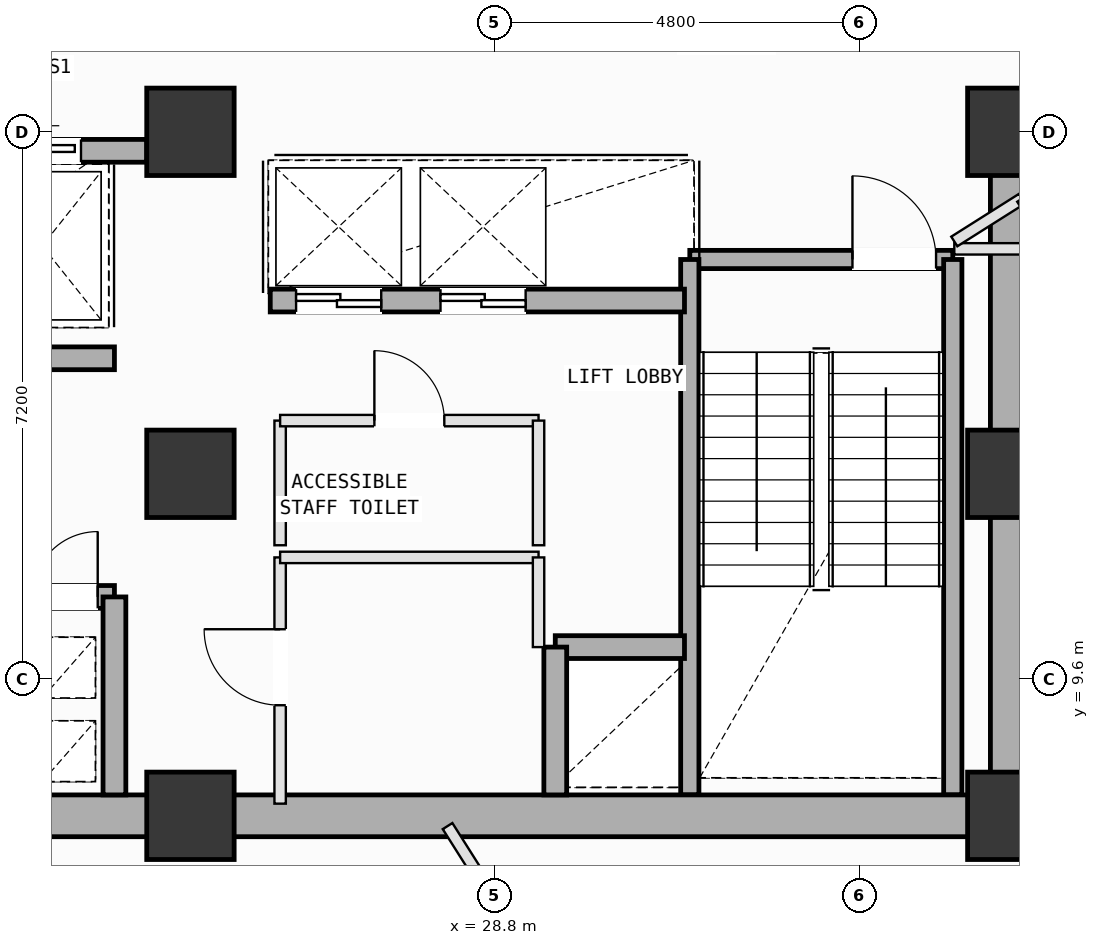
"""IFC4 building model, lengths in metres.
Left out: names, types, materials, properties, quantities, classifications, styles, units other than length and angle.
Written with IfcOpenShell. Run it as: python <this file> out.ifc"""

import sys

from ifc_helpers import new_model, si_unit, direction, frame, frame_2d, origin, origin_2d, place, context, subcontext, project, spatial, rectangle, extrude, element, fill, save


model = new_model("IFC4")
c1 = context("Model", 3, precision=1e-05, world=origin(), true_north=direction((0.0, 1.0)))
c2 = subcontext(c1, "Body", "Model", "MODEL_VIEW")
j1 = project(units=[si_unit("LENGTHUNIT", "METRE"), si_unit("PLANEANGLEUNIT", "RADIAN")], contexts=[c1])
p1 = place(None, origin())
s1 = spatial("IfcSite", under=j1, at=p1, CompositionType="ELEMENT")
p2 = place(p1, origin())
s2 = spatial("IfcBuilding", under=s1, at=p2, CompositionType="ELEMENT")
p3 = place(p2, frame((0.0, 0.0, 161.8)))
s3 = spatial("IfcBuildingStorey", under=s2, at=p3, CompositionType="ELEMENT", Elevation=161.8)
for number, where, z_axis, x_axis in (
    (1, (24.8, 7.8, 0.0), (0.0, 0.0, 1.0), (1.0, 0.0, 0.0)),
    (2, (24.8, 12.3, 0.0), (0.0, 0.0, 1.0), (1.0, 0.0, 0.0)),
    (3, (24.8, 16.8, 0.0), (0.0, 0.0, 1.0), (1.0, 0.0, 0.0)),
    (4, (35.6, 7.8, 0.0), (0.0, 0.0, 1.0), (1.0, 0.0, 0.0)),
    (5, (35.6, 12.3, 0.0), (0.0, 0.0, 1.0), (1.0, 0.0, 0.0)),
    (6, (35.6, 16.8, 0.0), (0.0, 0.0, 1.0), (1.0, 0.0, 0.0)),
):
    element("IfcColumn", number, at=place(p3, frame(where, z_axis=z_axis, x_axis=x_axis)), inside=s3, PredefinedType="COLUMN", context=c2, shape_type="SweptSolid", body=[
        extrude(rectangle(XDim=1.15, YDim=1.15, at=origin_2d()), origin(), (0.0, 0.0, 1.0), 4.0),
    ])
p4 = place(p3, frame((31.37, 15.12, 0.0), z_axis=(0.0, 0.0, 1.0), x_axis=(1.0, 0.0, 0.0)))
e7 = element("IfcWall", 7, at=p4, inside=s3, PredefinedType="SOLIDWALL", context=c2, shape_type="SweptSolid", body=[
    extrude(rectangle(XDim=3.46, YDim=0.24, at=frame_2d((1.73, 0.0))), origin(), (0.0, 0.0, 1.0), 3.78),
])
p5 = place(p4, frame((2.14, 0.0, 0.0)))
e8 = element("IfcOpeningElement", 8, at=p5, cuts=e7, PredefinedType="OPENING", context=c2, shape_type="SweptSolid", body=[
    extrude(rectangle(XDim=1.1, YDim=2.15, at=frame_2d((0.55, 1.075))), frame((0.0, 0.13, 0.0), z_axis=(0.0, -1.0, 0.0), x_axis=(1.0, 0.0, 0.0)), (0.0, 0.0, 1.0), 0.26),
])
for number, where, z_axis, x_axis in (
    (9, (34.83, 15.12, 0.0), (0.0, 0.0, 1.0), (0.0, -1.0, 0.0)),
    (10, (31.37, 8.075, 0.0), (0.0, 0.0, 1.0), (0.0, 1.0, 0.0)),
):
    element("IfcWall", number, at=place(p3, frame(where, z_axis=z_axis, x_axis=x_axis)), inside=s3, PredefinedType="SOLIDWALL", context=c2, shape_type="SweptSolid", body=[
        extrude(rectangle(XDim=7.045, YDim=0.24, at=frame_2d((3.522, 0.0))), origin(), (0.0, 0.0, 1.0), 3.78),
    ])
for number, where, z_axis, x_axis in (
    (11, (14.0, 7.8, 0.0), (0.0, 0.0, 1.0), (1.0, 0.0, 0.0)),
    (12, (24.8, 7.8, 0.0), (0.0, 0.0, 1.0), (1.0, 0.0, 0.0)),
):
    element("IfcWall", number, at=place(p3, frame(where, z_axis=z_axis, x_axis=x_axis)), inside=s3, PredefinedType="SHEAR", context=c2, shape_type="SweptSolid", body=[
        extrude(rectangle(XDim=10.8, YDim=0.55, at=frame_2d((5.4, 0.0))), origin(), (0.0, 0.0, 1.0), 3.78),
    ])
p6 = place(p3, frame((35.6, 7.8, 0.0), z_axis=(0.0, 0.0, 1.0), x_axis=(0.0, 1.0, 0.0)))
e13 = element("IfcWall", 13, at=p6, inside=s3, PredefinedType="SHEAR", context=c2, shape_type="SweptSolid", body=[
    extrude(rectangle(XDim=9.0, YDim=0.55, at=frame_2d((4.5, 0.0))), origin(), (0.0, 0.0, 1.0), 3.78),
])
p7 = place(p3, frame((19.85, 16.55, 0.0), z_axis=(0.0, 0.0, 1.0), x_axis=(1.0, 0.0, 0.0)))
e14 = element("IfcWall", 14, at=p7, inside=s3, PredefinedType="SOLIDWALL", context=c2, shape_type="SweptSolid", body=[
    extrude(rectangle(XDim=4.375, YDim=0.3, at=frame_2d((2.188, 0.0))), origin(), (0.0, 0.0, 1.0), 3.78),
])
p8 = place(p7, frame((0.475, 0.0, 0.0)))
e15 = element("IfcOpeningElement", 15, at=p8, cuts=e14, PredefinedType="OPENING", context=c2, shape_type="SweptSolid", body=[
    extrude(rectangle(XDim=1.25, YDim=2.18, at=frame_2d((0.625, 1.09))), frame((0.0, 0.16, 0.0), z_axis=(0.0, -1.0, 0.0), x_axis=(1.0, 0.0, 0.0)), (0.0, 0.0, 1.0), 0.32),
])
p9 = place(p7, frame((2.49, 0.0, 0.0)))
e16 = element("IfcOpeningElement", 16, at=p9, cuts=e14, PredefinedType="OPENING", context=c2, shape_type="SweptSolid", body=[
    extrude(rectangle(XDim=1.02, YDim=2.12, at=frame_2d((0.51, 1.06))), frame((0.0, 0.16, 0.0), z_axis=(0.0, -1.0, 0.0), x_axis=(1.0, 0.0, 0.0)), (0.0, 0.0, 1.0), 0.32),
])
p10 = place(p3, frame((18.5, 10.68, 0.0), z_axis=(0.0, 0.0, 1.0), x_axis=(1.0, 0.0, 0.0)))
e17 = element("IfcWall", 17, at=p10, inside=s3, PredefinedType="SOLIDWALL", context=c2, shape_type="SweptSolid", body=[
    extrude(rectangle(XDim=5.3, YDim=0.3, at=frame_2d((2.65, 0.0))), origin(), (0.0, 0.0, 1.0), 3.78),
])
p11 = place(p10, frame((4.22, 0.0, 0.0)))
e18 = element("IfcOpeningElement", 18, at=p11, cuts=e17, PredefinedType="OPENING", context=c2, shape_type="SweptSolid", body=[
    extrude(rectangle(XDim=0.86, YDim=2.06, at=frame_2d((0.43, 1.03))), frame((0.0, 0.16, 0.0), z_axis=(0.0, -1.0, 0.0), x_axis=(1.0, 0.0, 0.0)), (0.0, 0.0, 1.0), 0.32),
])
p12 = place(p10, frame((0.425, 0.0, 0.0)))
e19 = element("IfcOpeningElement", 19, at=p12, cuts=e17, PredefinedType="OPENING", context=c2, shape_type="SweptSolid", body=[
    extrude(rectangle(XDim=1.25, YDim=2.18, at=frame_2d((0.625, 1.09))), frame((0.0, 0.16, 0.0), z_axis=(0.0, -1.0, 0.0), x_axis=(1.0, 0.0, 0.0)), (0.0, 0.0, 1.0), 0.32),
])
p13 = place(p10, frame((2.525, 0.0, 0.0)))
e20 = element("IfcOpeningElement", 20, at=p13, cuts=e17, PredefinedType="OPENING", context=c2, shape_type="SweptSolid", body=[
    extrude(rectangle(XDim=1.25, YDim=2.18, at=frame_2d((0.625, 1.09))), frame((0.0, 0.16, 0.0), z_axis=(0.0, -1.0, 0.0), x_axis=(1.0, 0.0, 0.0)), (0.0, 0.0, 1.0), 0.32),
])
p14 = place(p3, frame((18.5, 13.82, 0.0), z_axis=(0.0, 0.0, 1.0), x_axis=(1.0, 0.0, 0.0)))
e21 = element("IfcWall", 21, at=p14, inside=s3, PredefinedType="SOLIDWALL", context=c2, shape_type="SweptSolid", body=[
    extrude(rectangle(XDim=5.3, YDim=0.3, at=frame_2d((2.65, 0.0))), origin(), (0.0, 0.0, 1.0), 3.78),
])
p15 = place(p14, frame((0.18, 0.0, 0.0)))
e22 = element("IfcOpeningElement", 22, at=p15, cuts=e21, PredefinedType="OPENING", context=c2, shape_type="SweptSolid", body=[
    extrude(rectangle(XDim=1.1, YDim=2.15, at=frame_2d((0.55, 1.075))), frame((0.0, 0.16, 0.0), z_axis=(0.0, -1.0, 0.0), x_axis=(1.0, 0.0, 0.0)), (0.0, 0.0, 1.0), 0.32),
])
p16 = place(p3, frame((23.8, 8.075, 0.0), z_axis=(0.0, 0.0, 1.0), x_axis=(0.0, 1.0, 0.0)))
e23 = element("IfcWall", 23, at=p16, inside=s3, PredefinedType="SOLIDWALL", context=c2, shape_type="SweptSolid", body=[
    extrude(rectangle(XDim=2.605, YDim=0.3, at=frame_2d((1.302, 0.0))), origin(), (0.0, 0.0, 1.0), 3.78),
])
p17 = place(p3, frame((29.6, 10.02, 0.0), z_axis=(0.0, 0.0, 1.0), x_axis=(1.0, 0.0, 0.0)))
e24 = element("IfcWall", 24, at=p17, inside=s3, PredefinedType="SOLIDWALL", context=c2, shape_type="SweptSolid", body=[
    extrude(rectangle(XDim=1.7, YDim=0.3, at=frame_2d((0.85, 0.0))), origin(), (0.0, 0.0, 1.0), 3.78),
])
p18 = place(p3, frame((29.6, 8.075, 0.0), z_axis=(0.0, 0.0, 1.0), x_axis=(0.0, 1.0, 0.0)))
e25 = element("IfcWall", 25, at=p18, inside=s3, PredefinedType="SOLIDWALL", context=c2, shape_type="SweptSolid", body=[
    extrude(rectangle(XDim=1.945, YDim=0.3, at=frame_2d((0.973, 0.0))), origin(), (0.0, 0.0, 1.0), 3.78),
])
p19 = place(p3, frame((25.85, 14.58, 0.0), z_axis=(0.0, 0.0, 1.0), x_axis=(1.0, 0.0, 0.0)))
e26 = element("IfcWall", 26, at=p19, inside=s3, PredefinedType="SOLIDWALL", context=c2, shape_type="SweptSolid", body=[
    extrude(rectangle(XDim=5.45, YDim=0.3, at=frame_2d((2.725, 0.0))), origin(), (0.0, 0.0, 1.0), 3.78),
])
p20 = place(p19, frame((0.34, 0.0, 0.0)))
e27 = element("IfcOpeningElement", 27, at=p20, cuts=e26, PredefinedType="OPENING", context=c2, shape_type="SweptSolid", body=[
    extrude(rectangle(XDim=1.12, YDim=2.15, at=frame_2d((0.56, 1.075))), frame((0.0, 0.16, 0.0), z_axis=(0.0, -1.0, 0.0), x_axis=(1.0, 0.0, 0.0)), (0.0, 0.0, 1.0), 0.32),
])
p21 = place(p19, frame((2.24, 0.0, 0.0)))
e28 = element("IfcOpeningElement", 28, at=p21, cuts=e26, PredefinedType="OPENING", context=c2, shape_type="SweptSolid", body=[
    extrude(rectangle(XDim=1.12, YDim=2.15, at=frame_2d((0.56, 1.075))), frame((0.0, 0.16, 0.0), z_axis=(0.0, -1.0, 0.0), x_axis=(1.0, 0.0, 0.0)), (0.0, 0.0, 1.0), 0.32),
])
p22 = place(p3, frame((25.98, 7.96, 0.0), z_axis=(0.0, 0.0, 1.0), x_axis=(0.0, 1.0, 0.0)))
e29 = element("IfcWall", 29, at=p22, inside=s3, PredefinedType="PARTITIONING", context=c2, shape_type="SweptSolid", body=[
    extrude(rectangle(XDim=3.24, YDim=0.15, at=frame_2d((1.62, 0.0))), origin(), (0.0, 0.0, 1.0), 3.78),
])
p23 = place(p22, frame((1.295, 0.0, 0.0)))
e30 = element("IfcOpeningElement", 30, at=p23, cuts=e29, PredefinedType="OPENING", context=c2, shape_type="SweptSolid", body=[
    extrude(rectangle(XDim=1.0, YDim=2.12, at=frame_2d((0.5, 1.06))), frame((0.0, 0.085, 0.0), z_axis=(0.0, -1.0, 0.0), x_axis=(1.0, 0.0, 0.0)), (0.0, 0.0, 1.0), 0.17),
])
p24 = place(p3, frame((25.98, 11.2, 0.0), z_axis=(0.0, 0.0, 1.0), x_axis=(1.0, 0.0, 0.0)))
e31 = element("IfcWall", 31, at=p24, inside=s3, PredefinedType="PARTITIONING", context=c2, shape_type="SweptSolid", body=[
    extrude(rectangle(XDim=3.4, YDim=0.15, at=frame_2d((1.7, 0.0))), origin(), (0.0, 0.0, 1.0), 3.78),
])
p25 = place(p3, frame((29.38, 11.2, 0.0), z_axis=(0.0, 0.0, 1.0), x_axis=(0.0, -1.0, 0.0)))
e32 = element("IfcWall", 32, at=p25, inside=s3, PredefinedType="PARTITIONING", context=c2, shape_type="SweptSolid", body=[
    extrude(rectangle(XDim=1.18, YDim=0.15, at=frame_2d((0.59, 0.0))), origin(), (0.0, 0.0, 1.0), 3.78),
])
p26 = place(p3, frame((25.98, 11.36, 0.0), z_axis=(0.0, 0.0, 1.0), x_axis=(0.0, 1.0, 0.0)))
e33 = element("IfcWall", 33, at=p26, inside=s3, PredefinedType="PARTITIONING", context=c2, shape_type="SweptSolid", body=[
    extrude(rectangle(XDim=1.64, YDim=0.15, at=frame_2d((0.82, 0.0))), origin(), (0.0, 0.0, 1.0), 3.78),
])
p27 = place(p3, frame((25.98, 13.0, 0.0), z_axis=(0.0, 0.0, 1.0), x_axis=(1.0, 0.0, 0.0)))
e34 = element("IfcWall", 34, at=p27, inside=s3, PredefinedType="PARTITIONING", context=c2, shape_type="SweptSolid", body=[
    extrude(rectangle(XDim=3.4, YDim=0.15, at=frame_2d((1.7, 0.0))), origin(), (0.0, 0.0, 1.0), 3.78),
])
p28 = place(p27, frame((1.24, 0.0, 0.0)))
e35 = element("IfcOpeningElement", 35, at=p28, cuts=e34, PredefinedType="OPENING", context=c2, shape_type="SweptSolid", body=[
    extrude(rectangle(XDim=0.92, YDim=2.1, at=frame_2d((0.46, 1.05))), frame((0.0, 0.085, 0.0), z_axis=(0.0, -1.0, 0.0), x_axis=(1.0, 0.0, 0.0)), (0.0, 0.0, 1.0), 0.17),
])
p29 = place(p3, frame((29.38, 13.0, 0.0), z_axis=(0.0, 0.0, 1.0), x_axis=(0.0, -1.0, 0.0)))
e36 = element("IfcWall", 36, at=p29, inside=s3, PredefinedType="PARTITIONING", context=c2, shape_type="SweptSolid", body=[
    extrude(rectangle(XDim=1.64, YDim=0.15, at=frame_2d((0.82, 0.0))), origin(), (0.0, 0.0, 1.0), 3.78),
])
p30 = place(p3, frame((28.183, 7.665, 0.0), z_axis=(0.0, 0.0, 1.0), x_axis=(0.534336995893, -0.845271539104, 0.0)))
e37 = element("IfcWall", 37, at=p30, inside=s3, PredefinedType="PARTITIONING", context=c2, shape_type="SweptSolid", body=[
    extrude(rectangle(XDim=10.546, YDim=0.15, at=frame_2d((5.273, 0.0))), origin(), (0.0, 0.0, 1.0), 3.78),
])
p31 = place(p30, frame((5.02, 0.0, 0.0)))
e38 = element("IfcOpeningElement", 38, at=p31, cuts=e37, PredefinedType="OPENING", context=c2, shape_type="SweptSolid", body=[
    extrude(rectangle(XDim=0.86, YDim=2.06, at=frame_2d((0.43, 1.03))), frame((0.0, 0.085, 0.0), z_axis=(0.0, -1.0, 0.0), x_axis=(1.0, 0.0, 0.0)), (0.0, 0.0, 1.0), 0.17),
])
p32 = place(p3, frame((36.15, 15.26, 0.0), z_axis=(0.0, 0.0, 1.0), x_axis=(-1.0, 0.0, 0.0)))
e39 = element("IfcWall", 39, at=p32, inside=s3, PredefinedType="PARTITIONING", context=c2, shape_type="SweptSolid", body=[
    extrude(rectangle(XDim=1.3, YDim=0.15, at=frame_2d((0.65, 0.0))), origin(), (0.0, 0.0, 1.0), 3.78),
])
p33 = place(p3, frame((34.85, 15.357, 0.0), z_axis=(0.0, 0.0, 1.0), x_axis=(0.84534574495, 0.534219591081, 0.0)))
e40 = element("IfcWall", 40, at=p33, inside=s3, PredefinedType="PARTITIONING", context=c2, shape_type="SweptSolid", body=[
    extrude(rectangle(XDim=1.054, YDim=0.15, at=frame_2d((0.527, 0.0))), origin(), (0.0, 0.0, 1.0), 3.78),
])
p34 = place(p3, frame((35.741, 15.92, 0.0), z_axis=(0.0, 0.0, 1.0), x_axis=(0.534355579838, -0.845259791008, 0.0)))
e41 = element("IfcWall", 41, at=p34, inside=s3, PredefinedType="PARTITIONING", context=c2, shape_type="SweptSolid", body=[
    extrude(rectangle(XDim=13.83, YDim=0.15, at=frame_2d((6.915, 0.0))), origin(), (0.0, 0.0, 1.0), 3.78),
])
p35 = place(p34, frame((6.485, 0.0, 0.0)))
e42 = element("IfcOpeningElement", 42, at=p35, cuts=e41, PredefinedType="OPENING", context=c2, shape_type="SweptSolid", body=[
    extrude(rectangle(XDim=0.86, YDim=2.06, at=frame_2d((0.43, 1.03))), frame((0.0, 0.085, 0.0), z_axis=(0.0, -1.0, 0.0), x_axis=(1.0, 0.0, 0.0)), (0.0, 0.0, 1.0), 0.17),
])
p36 = place(p3, frame((35.6, 7.5, 0.0), z_axis=(0.0, 0.0, 1.0), x_axis=(1.0, 0.0, 0.0)))
e43 = element("IfcWall", 43, at=p36, inside=s3, PredefinedType="PARTITIONING", context=c2, shape_type="SweptSolid", body=[
    extrude(rectangle(XDim=0.55, YDim=0.15, at=frame_2d((0.275, 0.0))), origin(), (0.0, 0.0, 1.0), 3.065),
])
p37 = place(p5, origin())
e44 = element("IfcDoor", 44, at=p37, inside=s3, OperationType="SINGLE_SWING_LEFT", PredefinedType="DOOR", context=c2, shape_type="SweptSolid", body=[
    extrude(rectangle(XDim=1.1, YDim=2.15, at=frame_2d((0.55, 1.075))), frame((0.0, 0.025, 0.0), z_axis=(0.0, -1.0, 0.0), x_axis=(1.0, 0.0, 0.0)), (0.0, 0.0, 1.0), 0.05),
])
fill(e8, e44)
p38 = place(p11, origin())
e45 = element("IfcDoor", 45, at=p38, inside=s3, OperationType="SINGLE_SWING_RIGHT", PredefinedType="DOOR", context=c2, shape_type="SweptSolid", body=[
    extrude(rectangle(XDim=0.86, YDim=2.06, at=frame_2d((0.43, 1.03))), frame((0.0, 0.025, 0.0), z_axis=(0.0, -1.0, 0.0), x_axis=(1.0, 0.0, 0.0)), (0.0, 0.0, 1.0), 0.05),
])
fill(e18, e45)
p39 = place(p20, origin())
e46 = element("IfcDoor", 46, at=p39, inside=s3, OperationType="DOUBLE_DOOR_SLIDING", PredefinedType="DOOR", context=c2, shape_type="SweptSolid", body=[
    extrude(rectangle(XDim=1.12, YDim=2.15, at=frame_2d((0.56, 1.075))), frame((0.0, 0.025, 0.0), z_axis=(0.0, -1.0, 0.0), x_axis=(1.0, 0.0, 0.0)), (0.0, 0.0, 1.0), 0.05),
])
fill(e27, e46)
p40 = place(p21, origin())
e47 = element("IfcDoor", 47, at=p40, inside=s3, OperationType="DOUBLE_DOOR_SLIDING", PredefinedType="DOOR", context=c2, shape_type="SweptSolid", body=[
    extrude(rectangle(XDim=1.12, YDim=2.15, at=frame_2d((0.56, 1.075))), frame((0.0, 0.025, 0.0), z_axis=(0.0, -1.0, 0.0), x_axis=(1.0, 0.0, 0.0)), (0.0, 0.0, 1.0), 0.05),
])
fill(e28, e47)
p41 = place(p9, origin())
e48 = element("IfcDoor", 48, at=p41, inside=s3, OperationType="SLIDING_TO_LEFT", PredefinedType="DOOR", context=c2, shape_type="SweptSolid", body=[
    extrude(rectangle(XDim=1.02, YDim=2.12, at=frame_2d((0.51, 1.06))), frame((0.0, 0.025, 0.0), z_axis=(0.0, -1.0, 0.0), x_axis=(1.0, 0.0, 0.0)), (0.0, 0.0, 1.0), 0.05),
])
fill(e16, e48)
p42 = place(p23, origin())
e49 = element("IfcDoor", 49, at=p42, inside=s3, OperationType="SINGLE_SWING_RIGHT", PredefinedType="DOOR", context=c2, shape_type="SweptSolid", body=[
    extrude(rectangle(XDim=1.0, YDim=2.12, at=frame_2d((0.5, 1.06))), frame((0.0, 0.025, 0.0), z_axis=(0.0, -1.0, 0.0), x_axis=(1.0, 0.0, 0.0)), (0.0, 0.0, 1.0), 0.05),
])
fill(e30, e49)
p43 = place(p28, origin())
e50 = element("IfcDoor", 50, at=p43, inside=s3, OperationType="SINGLE_SWING_LEFT", PredefinedType="DOOR", context=c2, shape_type="SweptSolid", body=[
    extrude(rectangle(XDim=0.92, YDim=2.1, at=frame_2d((0.46, 1.05))), frame((0.0, 0.025, 0.0), z_axis=(0.0, -1.0, 0.0), x_axis=(1.0, 0.0, 0.0)), (0.0, 0.0, 1.0), 0.05),
])
fill(e35, e50)
save(model, sys.argv[1])
